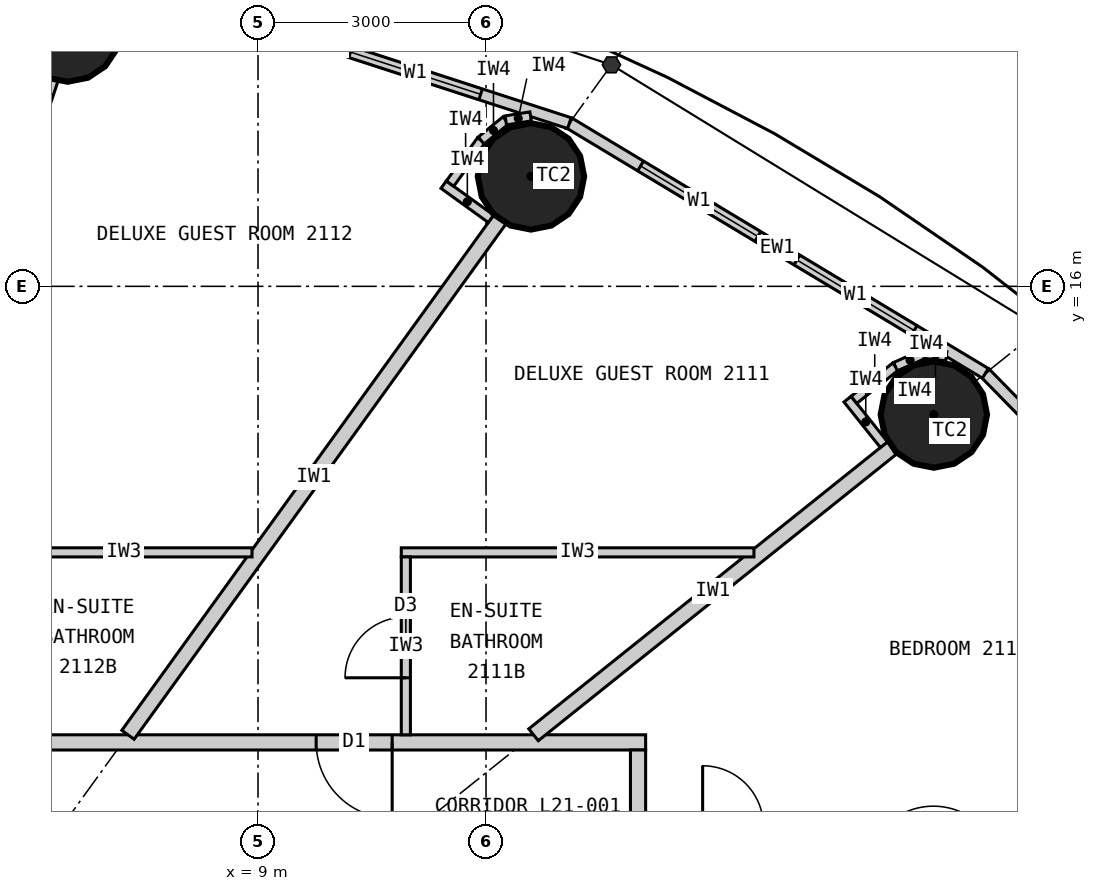
"""IFC4 building model, lengths in metres.
Left out: names, types, materials, properties, quantities, classifications, styles, units other than length and angle.
Written with IfcOpenShell. Run it as: python <this file> out.ifc"""

import sys

from ifc_helpers import new_model, si_unit, direction, frame, frame_2d, origin, origin_2d, place, context, subcontext, project, spatial, rectangle, circle, extrude, element, fill, save


model = new_model("IFC4")
c1 = context("Model", 3, precision=1e-05, world=origin(), true_north=direction((0.0, 1.0)))
c2 = subcontext(c1, "Body", "Model", "MODEL_VIEW")
j1 = project(units=[si_unit("LENGTHUNIT", "METRE"), si_unit("PLANEANGLEUNIT", "RADIAN")], contexts=[c1])
p1 = place(None, origin())
s1 = spatial("IfcSite", under=j1, at=p1, CompositionType="ELEMENT")
p2 = place(p1, origin())
s2 = spatial("IfcBuilding", under=s1, at=p2, CompositionType="ELEMENT")
p3 = place(p2, frame((0.0, 0.0, 83.7)))
s3 = spatial("IfcBuildingStorey", under=s2, at=p3, CompositionType="ELEMENT", Elevation=83.7)
for number, where, z_axis, x_axis in (
    (1, (17.892, 14.313, 0.0), (0.0, 0.0, 1.0), (1.0, 0.0, 0.0)),
    (2, (12.591, 17.447, 0.0), (0.0, 0.0, 1.0), (1.0, 0.0, 0.0)),
    (3, (6.495, 19.391, 0.0), (0.0, 0.0, 1.0), (1.0, 0.0, 0.0)),
):
    element("IfcColumn", number, at=place(p3, frame(where, z_axis=z_axis, x_axis=x_axis)), inside=s3, PredefinedType="COLUMN", context=c2, shape_type="SweptSolid", body=[
        extrude(circle(Radius=0.7, at=origin_2d()), origin(), (0.0, 0.0, 1.0), 3.3),
    ])
p4 = place(p3, frame((22.803, 10.532, 0.0), z_axis=(0.0, 0.0, 1.0), x_axis=(-0.699602905915, 0.714531856557, 0.0)))
e4 = element("IfcWall", 4, at=p4, inside=s3, PredefinedType="ELEMENTEDWALL", context=c2, shape_type="SweptSolid", body=[
    extrude(rectangle(XDim=6.051, YDim=0.15, at=frame_2d((3.025, 0.0))), origin(), (0.0, 0.0, 1.0), 3.12),
])
p5 = place(p4, frame((0.926, 0.0, 0.9)))
e5 = element("IfcOpeningElement", 5, at=p5, cuts=e4, PredefinedType="OPENING", context=c2, shape_type="SweptSolid", body=[
    extrude(rectangle(XDim=1.8, YDim=1.9, at=frame_2d((0.9, 0.95))), frame((0.0, 0.085, 0.0), z_axis=(0.0, -1.0, 0.0), x_axis=(1.0, 0.0, 0.0)), (0.0, 0.0, 1.0), 0.17),
])
p6 = place(p4, frame((3.325, 0.0, 0.9)))
e6 = element("IfcOpeningElement", 6, at=p6, cuts=e4, PredefinedType="OPENING", context=c2, shape_type="SweptSolid", body=[
    extrude(rectangle(XDim=1.8, YDim=1.9, at=frame_2d((0.9, 0.95))), frame((0.0, 0.085, 0.0), z_axis=(0.0, -1.0, 0.0), x_axis=(1.0, 0.0, 0.0)), (0.0, 0.0, 1.0), 0.17),
])
p7 = place(p3, frame((18.57, 14.856, 0.0), z_axis=(0.0, 0.0, 1.0), x_axis=(-0.856983180864, 0.515344377787, 0.0)))
e7 = element("IfcWall", 7, at=p7, inside=s3, PredefinedType="ELEMENTEDWALL", context=c2, shape_type="SweptSolid", body=[
    extrude(rectangle(XDim=6.386, YDim=0.15, at=frame_2d((3.193, 0.0))), origin(), (0.0, 0.0, 1.0), 3.12),
])
p8 = place(p7, frame((1.093, 0.0, 0.9)))
e8 = element("IfcOpeningElement", 8, at=p8, cuts=e7, PredefinedType="OPENING", context=c2, shape_type="SweptSolid", body=[
    extrude(rectangle(XDim=1.8, YDim=1.9, at=frame_2d((0.9, 0.95))), frame((0.0, 0.085, 0.0), z_axis=(0.0, -1.0, 0.0), x_axis=(1.0, 0.0, 0.0)), (0.0, 0.0, 1.0), 0.17),
])
p9 = place(p7, frame((3.493, 0.0, 0.9)))
e9 = element("IfcOpeningElement", 9, at=p9, cuts=e7, PredefinedType="OPENING", context=c2, shape_type="SweptSolid", body=[
    extrude(rectangle(XDim=1.8, YDim=1.9, at=frame_2d((0.9, 0.95))), frame((0.0, 0.085, 0.0), z_axis=(0.0, -1.0, 0.0), x_axis=(1.0, 0.0, 0.0)), (0.0, 0.0, 1.0), 0.17),
])
p10 = place(p3, frame((13.096, 18.147, 0.0), z_axis=(0.0, 0.0, 1.0), x_axis=(-0.951137534625, 0.308767534285, 0.0)))
e10 = element("IfcWall", 10, at=p10, inside=s3, PredefinedType="ELEMENTEDWALL", context=c2, shape_type="SweptSolid", body=[
    extrude(rectangle(XDim=6.655, YDim=0.15, at=frame_2d((3.328, 0.0))), origin(), (0.0, 0.0, 1.0), 3.12),
])
p11 = place(p10, frame((1.228, 0.0, 0.9)))
e11 = element("IfcOpeningElement", 11, at=p11, cuts=e10, PredefinedType="OPENING", context=c2, shape_type="SweptSolid", body=[
    extrude(rectangle(XDim=1.8, YDim=1.9, at=frame_2d((0.9, 0.95))), frame((0.0, 0.085, 0.0), z_axis=(0.0, -1.0, 0.0), x_axis=(1.0, 0.0, 0.0)), (0.0, 0.0, 1.0), 0.17),
])
p12 = place(p10, frame((3.628, 0.0, 0.9)))
e12 = element("IfcOpeningElement", 12, at=p12, cuts=e10, PredefinedType="OPENING", context=c2, shape_type="SweptSolid", body=[
    extrude(rectangle(XDim=1.8, YDim=1.9, at=frame_2d((0.9, 0.95))), frame((0.0, 0.085, 0.0), z_axis=(0.0, -1.0, 0.0), x_axis=(1.0, 0.0, 0.0)), (0.0, 0.0, 1.0), 0.17),
])
p13 = place(p3, frame((-14.1, 10.0, 0.0), z_axis=(0.0, 0.0, 1.0), x_axis=(1.0, 0.0, 0.0)))
e13 = element("IfcWall", 13, at=p13, inside=s3, PredefinedType="PARTITIONING", context=c2, shape_type="SweptSolid", body=[
    extrude(rectangle(XDim=28.2, YDim=0.2, at=frame_2d((14.1, 0.0))), origin(), (0.0, 0.0, 1.0), 3.12),
])
p14 = place(p13, frame((23.865, 0.0, 0.0)))
e14 = element("IfcOpeningElement", 14, at=p14, cuts=e13, PredefinedType="OPENING", context=c2, shape_type="SweptSolid", body=[
    extrude(rectangle(XDim=1.0, YDim=2.2, at=frame_2d((0.5, 1.1))), frame((0.0, 0.11, 0.0), z_axis=(0.0, -1.0, 0.0), x_axis=(1.0, 0.0, 0.0)), (0.0, 0.0, 1.0), 0.22),
])
p15 = place(p13, frame((18.529, 0.0, 0.0)))
e15 = element("IfcOpeningElement", 15, at=p15, cuts=e13, PredefinedType="OPENING", context=c2, shape_type="SweptSolid", body=[
    extrude(rectangle(XDim=1.0, YDim=2.2, at=frame_2d((0.5, 1.1))), frame((0.0, 0.11, 0.0), z_axis=(0.0, -1.0, 0.0), x_axis=(1.0, 0.0, 0.0)), (0.0, 0.0, 1.0), 0.22),
])
p16 = place(p13, frame((14.623, 0.0, 0.0)))
e16 = element("IfcOpeningElement", 16, at=p16, cuts=e13, PredefinedType="OPENING", context=c2, shape_type="SweptSolid", body=[
    extrude(rectangle(XDim=1.0, YDim=2.2, at=frame_2d((0.5, 1.1))), frame((0.0, 0.11, 0.0), z_axis=(0.0, -1.0, 0.0), x_axis=(1.0, 0.0, 0.0)), (0.0, 0.0, 1.0), 0.22),
])
p17 = place(p13, frame((11.24, 0.0, 0.0)))
e17 = element("IfcOpeningElement", 17, at=p17, cuts=e13, PredefinedType="OPENING", context=c2, shape_type="SweptSolid", body=[
    extrude(rectangle(XDim=1.0, YDim=2.2, at=frame_2d((0.5, 1.1))), frame((0.0, 0.11, 0.0), z_axis=(0.0, -1.0, 0.0), x_axis=(1.0, 0.0, 0.0)), (0.0, 0.0, 1.0), 0.22),
])
p18 = place(p13, frame((8.671, 0.0, 0.0)))
e18 = element("IfcOpeningElement", 18, at=p18, cuts=e13, PredefinedType="OPENING", context=c2, shape_type="SweptSolid", body=[
    extrude(rectangle(XDim=1.0, YDim=2.2, at=frame_2d((0.5, 1.1))), frame((0.0, 0.11, 0.0), z_axis=(0.0, -1.0, 0.0), x_axis=(1.0, 0.0, 0.0)), (0.0, 0.0, 1.0), 0.22),
])
p19 = place(p13, frame((2.801, 0.0, 0.0)))
e19 = element("IfcOpeningElement", 19, at=p19, cuts=e13, PredefinedType="OPENING", context=c2, shape_type="SweptSolid", body=[
    extrude(rectangle(XDim=1.0, YDim=2.2, at=frame_2d((0.5, 1.1))), frame((0.0, 0.11, 0.0), z_axis=(0.0, -1.0, 0.0), x_axis=(1.0, 0.0, 0.0)), (0.0, 0.0, 1.0), 0.22),
])
p20 = place(p3, frame((14.0, -9.9, 0.0), z_axis=(0.0, 0.0, 1.0), x_axis=(0.0, 1.0, 0.0)))
e20 = element("IfcWall", 20, at=p20, inside=s3, PredefinedType="PARTITIONING", context=c2, shape_type="SweptSolid", body=[
    extrude(rectangle(XDim=19.8, YDim=0.2, at=frame_2d((9.9, 0.0))), origin(), (0.0, 0.0, 1.0), 3.12),
])
p21 = place(p20, frame((5.948, 0.0, 0.0)))
e21 = element("IfcOpeningElement", 21, at=p21, cuts=e20, PredefinedType="OPENING", context=c2, shape_type="SweptSolid", body=[
    extrude(rectangle(XDim=1.0, YDim=2.2, at=frame_2d((0.5, 1.1))), frame((0.0, 0.11, 0.0), z_axis=(0.0, -1.0, 0.0), x_axis=(1.0, 0.0, 0.0)), (0.0, 0.0, 1.0), 0.22),
])
p22 = place(p20, frame((11.46, 0.0, 0.0)))
e22 = element("IfcOpeningElement", 22, at=p22, cuts=e20, PredefinedType="OPENING", context=c2, shape_type="SweptSolid", body=[
    extrude(rectangle(XDim=1.0, YDim=2.2, at=frame_2d((0.5, 1.1))), frame((0.0, 0.11, 0.0), z_axis=(0.0, -1.0, 0.0), x_axis=(1.0, 0.0, 0.0)), (0.0, 0.0, 1.0), 0.22),
])
p23 = place(p3, frame((14.1, 6.512, 0.0), z_axis=(0.0, 0.0, 1.0), x_axis=(0.907832871056, 0.419332181247, 0.0)))
e23 = element("IfcWall", 23, at=p23, inside=s3, PredefinedType="PARTITIONING", context=c2, shape_type="SweptSolid", body=[
    extrude(rectangle(XDim=8.023, YDim=0.2, at=frame_2d((4.011, 0.0))), origin(), (0.0, 0.0, 1.0), 2.32),
])
p24 = place(p23, frame((4.17, 0.0, 0.0)))
e24 = element("IfcOpeningElement", 24, at=p24, cuts=e23, PredefinedType="OPENING", context=c2, shape_type="SweptSolid", body=[
    extrude(rectangle(XDim=0.9, YDim=2.1, at=frame_2d((0.45, 1.05))), frame((0.0, 0.11, 0.0), z_axis=(0.0, -1.0, 0.0), x_axis=(1.0, 0.0, 0.0)), (0.0, 0.0, 1.0), 0.22),
])
p25 = place(p3, frame((12.625, 10.1, 0.0), z_axis=(0.0, 0.0, 1.0), x_axis=(0.780892451574, 0.624665493744, 0.0)))
e25 = element("IfcWall", 25, at=p25, inside=s3, PredefinedType="PARTITIONING", context=c2, shape_type="SweptSolid", body=[
    extrude(rectangle(XDim=6.045, YDim=0.2, at=frame_2d((3.022, 0.0))), origin(), (0.0, 0.0, 1.0), 2.32),
])
p26 = place(p3, frame((7.289, 10.1, 0.0), z_axis=(0.0, 0.0, 1.0), x_axis=(0.585198353053, 0.810890182197, 0.0)))
e26 = element("IfcWall", 26, at=p26, inside=s3, PredefinedType="PARTITIONING", context=c2, shape_type="SweptSolid", body=[
    extrude(rectangle(XDim=8.36, YDim=0.2, at=frame_2d((4.18, 0.0))), origin(), (0.0, 0.0, 1.0), 2.32),
])
p27 = place(p3, frame((3.383, 10.1, 0.0), z_axis=(0.0, 0.0, 1.0), x_axis=(0.31759592231, 0.948226149256, 0.0)))
e27 = element("IfcWall", 27, at=p27, inside=s3, PredefinedType="PARTITIONING", context=c2, shape_type="SweptSolid", body=[
    extrude(rectangle(XDim=9.098, YDim=0.2, at=frame_2d((4.549, 0.0))), origin(), (0.0, 0.0, 1.0), 2.32),
])
p28 = place(p3, frame((15.525, 12.5, 0.0), z_axis=(0.0, 0.0, 1.0), x_axis=(-1.0, 0.0, 0.0)))
e28 = element("IfcWall", 28, at=p28, inside=s3, PredefinedType="PARTITIONING", context=c2, shape_type="SweptSolid", body=[
    extrude(rectangle(XDim=4.64, YDim=0.12, at=frame_2d((2.32, 0.0))), origin(), (0.0, 0.0, 1.0), 3.12),
])
p29 = place(p3, frame((10.945, 10.1, 0.0), z_axis=(0.0, 0.0, 1.0), x_axis=(0.0, 1.0, 0.0)))
e29 = element("IfcWall", 29, at=p29, inside=s3, PredefinedType="PARTITIONING", context=c2, shape_type="SweptSolid", body=[
    extrude(rectangle(XDim=2.34, YDim=0.12, at=frame_2d((1.17, 0.0))), origin(), (0.0, 0.0, 1.0), 3.12),
])
p30 = place(p29, frame((0.75, 0.0, 0.0)))
e30 = element("IfcOpeningElement", 30, at=p30, cuts=e29, PredefinedType="OPENING", context=c2, shape_type="SweptSolid", body=[
    extrude(rectangle(XDim=0.8, YDim=2.1, at=frame_2d((0.4, 1.05))), frame((0.0, 0.07, 0.0), z_axis=(0.0, -1.0, 0.0), x_axis=(1.0, 0.0, 0.0)), (0.0, 0.0, 1.0), 0.14),
])
p31 = place(p3, frame((8.921, 12.5, 0.0), z_axis=(0.0, 0.0, 1.0), x_axis=(-1.0, 0.0, 0.0)))
e31 = element("IfcWall", 31, at=p31, inside=s3, PredefinedType="PARTITIONING", context=c2, shape_type="SweptSolid", body=[
    extrude(rectangle(XDim=3.372, YDim=0.12, at=frame_2d((1.686, 0.0))), origin(), (0.0, 0.0, 1.0), 3.12),
])
p32 = place(p3, frame((17.236, 13.917, 0.0), z_axis=(0.0, 0.0, 1.0), x_axis=(-0.624695047554, 0.780868809443, 0.0)))
e32 = element("IfcWall", 32, at=p32, inside=s3, PredefinedType="PARTITIONING", context=c2, shape_type="SweptSolid", body=[
    extrude(rectangle(XDim=0.768, YDim=0.12, at=frame_2d((0.384, 0.0))), origin(), (0.0, 0.0, 1.0), 3.12),
])
p33 = place(p3, frame((16.841, 14.507, 0.0), z_axis=(0.0, 0.0, 1.0), x_axis=(0.780902834923, 0.62465251333, 0.0)))
e33 = element("IfcWall", 33, at=p33, inside=s3, PredefinedType="PARTITIONING", context=c2, shape_type="SweptSolid", body=[
    extrude(rectangle(XDim=0.7, YDim=0.12, at=frame_2d((0.35, 0.0))), origin(), (0.0, 0.0, 1.0), 3.12),
])
p34 = place(p3, frame((17.387, 14.944, 0.0), z_axis=(0.0, 0.0, 1.0), x_axis=(0.916036698064, 0.401094462441, 0.0)))
e34 = element("IfcWall", 34, at=p34, inside=s3, PredefinedType="PARTITIONING", context=c2, shape_type="SweptSolid", body=[
    extrude(rectangle(XDim=0.418, YDim=0.12, at=frame_2d((0.209, 0.0))), origin(), (0.0, 0.0, 1.0), 3.12),
])
p35 = place(p3, frame((17.77, 15.112, 0.0), z_axis=(0.0, 0.0, 1.0), x_axis=(0.993904401174, -0.110245368731, 0.0)))
e35 = element("IfcWall", 35, at=p35, inside=s3, PredefinedType="PARTITIONING", context=c2, shape_type="SweptSolid", body=[
    extrude(rectangle(XDim=0.288, YDim=0.12, at=frame_2d((0.144, 0.0))), origin(), (0.0, 0.0, 1.0), 3.12),
])
p36 = place(p3, frame((12.065, 16.889, 0.0), z_axis=(0.0, 0.0, 1.0), x_axis=(-0.810821798253, 0.585293098778, 0.0)))
e36 = element("IfcWall", 36, at=p36, inside=s3, PredefinedType="PARTITIONING", context=c2, shape_type="SweptSolid", body=[
    extrude(rectangle(XDim=0.768, YDim=0.12, at=frame_2d((0.384, 0.0))), origin(), (0.0, 0.0, 1.0), 3.12),
])
p37 = place(p3, frame((11.526, 17.351, 0.0), z_axis=(0.0, 0.0, 1.0), x_axis=(0.585223113993, 0.810872312296, 0.0)))
e37 = element("IfcWall", 37, at=p37, inside=s3, PredefinedType="PARTITIONING", context=c2, shape_type="SweptSolid", body=[
    extrude(rectangle(XDim=0.7, YDim=0.12, at=frame_2d((0.35, 0.0))), origin(), (0.0, 0.0, 1.0), 3.12),
])
p38 = place(p3, frame((11.936, 17.919, 0.0), z_axis=(0.0, 0.0, 1.0), x_axis=(0.775023088441, 0.631932917629, 0.0)))
e38 = element("IfcWall", 38, at=p38, inside=s3, PredefinedType="PARTITIONING", context=c2, shape_type="SweptSolid", body=[
    extrude(rectangle(XDim=0.418, YDim=0.12, at=frame_2d((0.209, 0.0))), origin(), (0.0, 0.0, 1.0), 3.12),
])
p39 = place(p3, frame((12.26, 18.183, 0.0), z_axis=(0.0, 0.0, 1.0), x_axis=(0.987218661664, 0.159371622511, 0.0)))
e39 = element("IfcWall", 39, at=p39, inside=s3, PredefinedType="PARTITIONING", context=c2, shape_type="SweptSolid", body=[
    extrude(rectangle(XDim=0.331, YDim=0.12, at=frame_2d((0.166, 0.0))), origin(), (0.0, 0.0, 1.0), 3.12),
])
p40 = place(p8, origin())
e40 = element("IfcWindow", 40, at=p40, inside=s3, PartitioningType="SINGLE_PANEL", PredefinedType="WINDOW", context=c2, shape_type="SweptSolid", body=[
    extrude(rectangle(XDim=1.8, YDim=1.9, at=frame_2d((0.9, 0.95))), frame((0.0, 0.03, 0.0), z_axis=(0.0, -1.0, 0.0), x_axis=(1.0, 0.0, 0.0)), (0.0, 0.0, 1.0), 0.06),
])
fill(e8, e40)
p41 = place(p9, origin())
e41 = element("IfcWindow", 41, at=p41, inside=s3, PartitioningType="SINGLE_PANEL", PredefinedType="WINDOW", context=c2, shape_type="SweptSolid", body=[
    extrude(rectangle(XDim=1.8, YDim=1.9, at=frame_2d((0.9, 0.95))), frame((0.0, 0.03, 0.0), z_axis=(0.0, -1.0, 0.0), x_axis=(1.0, 0.0, 0.0)), (0.0, 0.0, 1.0), 0.06),
])
fill(e9, e41)
p42 = place(p11, origin())
e42 = element("IfcWindow", 42, at=p42, inside=s3, PartitioningType="SINGLE_PANEL", PredefinedType="WINDOW", context=c2, shape_type="SweptSolid", body=[
    extrude(rectangle(XDim=1.8, YDim=1.9, at=frame_2d((0.9, 0.95))), frame((0.0, 0.03, 0.0), z_axis=(0.0, -1.0, 0.0), x_axis=(1.0, 0.0, 0.0)), (0.0, 0.0, 1.0), 0.06),
])
fill(e11, e42)
p43 = place(p30, origin())
e43 = element("IfcDoor", 43, at=p43, inside=s3, OperationType="SINGLE_SWING_LEFT", PredefinedType="DOOR", context=c2, shape_type="SweptSolid", body=[
    extrude(rectangle(XDim=0.8, YDim=2.1, at=frame_2d((0.4, 1.05))), frame((0.0, 0.025, 0.0), z_axis=(0.0, -1.0, 0.0), x_axis=(1.0, 0.0, 0.0)), (0.0, 0.0, 1.0), 0.05),
])
fill(e30, e43)
p44 = place(p14, origin())
e44 = element("IfcDoor", 44, at=p44, inside=s3, OperationType="SINGLE_SWING_RIGHT", PredefinedType="DOOR", context=c2, shape_type="SweptSolid", body=[
    extrude(rectangle(XDim=1.0, YDim=2.2, at=frame_2d((0.5, 1.1))), frame((0.0, 0.025, 0.0), z_axis=(0.0, -1.0, 0.0), x_axis=(1.0, 0.0, 0.0)), (0.0, 0.0, 1.0), 0.05),
])
fill(e14, e44)
save(model, sys.argv[1])
